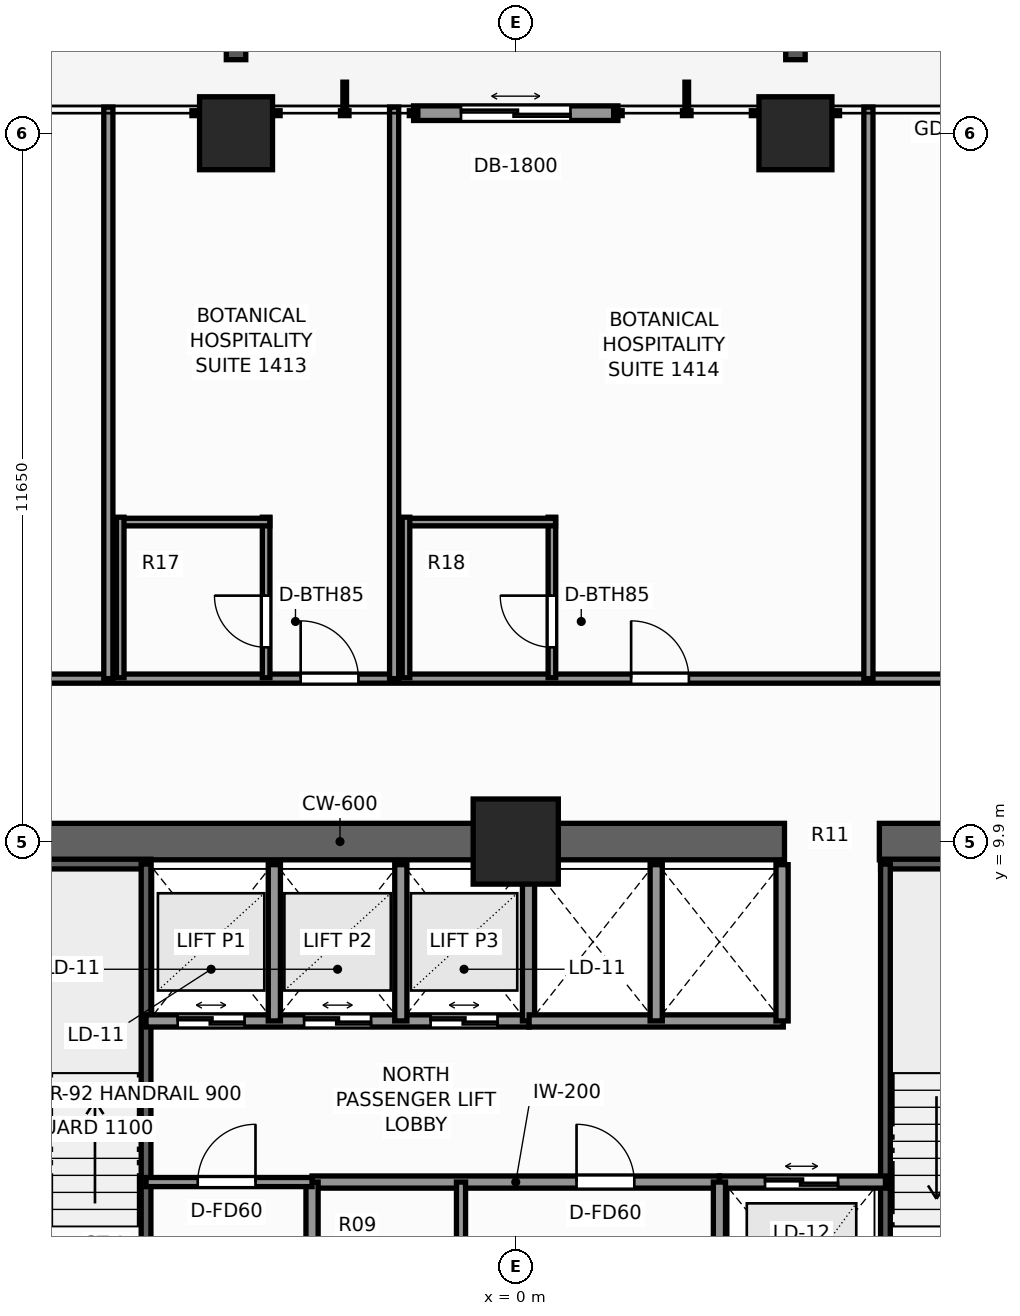
"""IFC4 building model, lengths in metres.
Left out: names, types, materials, properties, quantities, classifications, styles, units other than length and angle.
Written with IfcOpenShell. Run it as: python <this file> out.ifc"""

import sys

from ifc_helpers import new_model, si_unit, direction, frame, frame_2d, origin, origin_2d, place, context, subcontext, project, spatial, rectangle, extrude, element, fill, save


model = new_model("IFC4")
c1 = context("Model", 3, precision=1e-05, world=origin(), true_north=direction((0.0, 1.0)))
c2 = subcontext(c1, "Body", "Model", "MODEL_VIEW")
j1 = project(units=[si_unit("LENGTHUNIT", "METRE"), si_unit("PLANEANGLEUNIT", "RADIAN")], contexts=[c1])
p1 = place(None, origin())
s1 = spatial("IfcSite", under=j1, at=p1, CompositionType="ELEMENT")
p2 = place(p1, origin())
s2 = spatial("IfcBuilding", under=s1, at=p2, CompositionType="ELEMENT")
p3 = place(p2, frame((0.0, 0.0, 50.2)))
s3 = spatial("IfcBuildingStorey", under=s2, at=p3, CompositionType="ELEMENT", Elevation=50.2)
p4 = place(p3, frame((-10.2, 9.9, 0.0), z_axis=(0.0, 0.0, 1.0), x_axis=(1.0, 0.0, 0.0)))
e1 = element("IfcWall", 1, at=p4, inside=s3, PredefinedType="SHEAR", context=c2, shape_type="SweptSolid", body=[
    extrude(rectangle(XDim=14.62, YDim=0.6, at=frame_2d((7.31, 0.0))), origin(), (0.0, 0.0, 1.0), 3.3),
])
p5 = place(p3, frame((5.98, 9.9, 0.0), z_axis=(0.0, 0.0, 1.0), x_axis=(1.0, 0.0, 0.0)))
e2 = element("IfcWall", 2, at=p5, inside=s3, PredefinedType="SHEAR", context=c2, shape_type="SweptSolid", body=[
    extrude(rectangle(XDim=4.22, YDim=0.6, at=frame_2d((2.11, 0.0))), origin(), (0.0, 0.0, 1.0), 3.3),
])
p6 = place(p3, frame((0.0, 9.9, 0.0), z_axis=(0.0, 0.0, 1.0), x_axis=(1.0, 0.0, 0.0)))
e3 = element("IfcColumn", 3, at=p6, inside=s3, PredefinedType="COLUMN", context=c2, shape_type="SweptSolid", body=[
    extrude(rectangle(XDim=1.4, YDim=1.4, at=origin_2d()), origin(), (0.0, 0.0, 1.0), 3.3),
])
for number, where, z_axis, x_axis in (
    (4, (-4.6, 21.55, 0.0), (0.0, 0.0, 1.0), (1.0, 0.0, 0.0)),
    (5, (4.6, 21.55, 0.0), (0.0, 0.0, 1.0), (1.0, 0.0, 0.0)),
):
    element("IfcColumn", number, at=place(p3, frame(where, z_axis=z_axis, x_axis=x_axis)), inside=s3, PredefinedType="COLUMN", context=c2, shape_type="SweptSolid", body=[
        extrude(rectangle(XDim=1.2, YDim=1.2, at=origin_2d()), origin(), (0.0, 0.0, 1.0), 3.3),
    ])
p7 = place(p3, frame((-1.68, 21.88, 0.0), z_axis=(0.0, 0.0, 1.0), x_axis=(1.0, 0.0, 0.0)))
e6 = element("IfcWall", 6, at=p7, inside=s3, PredefinedType="STANDARD", context=c2, shape_type="SweptSolid", body=[
    extrude(rectangle(XDim=3.36, YDim=0.24, at=frame_2d((1.68, 0.0))), origin(), (0.0, 0.0, 1.0), 3.06),
])
p8 = place(p7, frame((0.78, 0.0, 0.0)))
e7 = element("IfcOpeningElement", 7, at=p8, cuts=e6, PredefinedType="OPENING", context=c2, shape_type="SweptSolid", body=[
    extrude(rectangle(XDim=1.8, YDim=2.2, at=frame_2d((0.9, 1.1))), frame((0.0, 0.13, 0.0), z_axis=(0.0, -1.0, 0.0), x_axis=(1.0, 0.0, 0.0)), (0.0, 0.0, 1.0), 0.26),
])
p9 = place(p3, frame((-9.52, 9.53, 0.0), z_axis=(0.0, 0.0, 1.0), x_axis=(1.0, 0.0, 0.0)))
e8 = element("IfcWall", 8, at=p9, inside=s3, PredefinedType="SHEAR", context=c2, shape_type="SweptSolid", body=[
    extrude(rectangle(XDim=3.52, YDim=0.16, at=frame_2d((1.76, 0.0))), origin(), (0.0, 0.0, 1.0), 3.3),
])
p10 = place(p3, frame((-6.08, 1.97, 0.0), z_axis=(0.0, 0.0, 1.0), x_axis=(0.0, 1.0, 0.0)))
e9 = element("IfcWall", 9, at=p10, inside=s3, PredefinedType="SHEAR", context=c2, shape_type="SweptSolid", body=[
    extrude(rectangle(XDim=7.56, YDim=0.16, at=frame_2d((3.78, 0.0))), origin(), (0.0, 0.0, 1.0), 3.3),
])
p11 = place(p3, frame((6.0, 9.53, 0.0), z_axis=(0.0, 0.0, 1.0), x_axis=(1.0, 0.0, 0.0)))
e10 = element("IfcWall", 10, at=p11, inside=s3, PredefinedType="SHEAR", context=c2, shape_type="SweptSolid", body=[
    extrude(rectangle(XDim=3.52, YDim=0.16, at=frame_2d((1.76, 0.0))), origin(), (0.0, 0.0, 1.0), 3.3),
])
p12 = place(p3, frame((6.08, 1.97, 0.0), z_axis=(0.0, 0.0, 1.0), x_axis=(0.0, 1.0, 0.0)))
e11 = element("IfcWall", 11, at=p12, inside=s3, PredefinedType="SHEAR", context=c2, shape_type="SweptSolid", body=[
    extrude(rectangle(XDim=7.56, YDim=0.16, at=frame_2d((3.78, 0.0))), origin(), (0.0, 0.0, 1.0), 3.3),
])
p13 = place(p3, frame((3.35, 4.3, 0.0), z_axis=(0.0, 0.0, 1.0), x_axis=(1.0, 0.0, 0.0)))
e12 = element("IfcWall", 12, at=p13, inside=s3, PredefinedType="SOLIDWALL", context=c2, shape_type="SweptSolid", body=[
    extrude(rectangle(XDim=2.73, YDim=0.2, at=frame_2d((1.365, 0.0))), origin(), (0.0, 0.0, 1.0), 3.06),
])
p14 = place(p13, frame((0.75, 0.0, 0.0)))
e13 = element("IfcOpeningElement", 13, at=p14, cuts=e12, PredefinedType="OPENING", context=c2, shape_type="SweptSolid", body=[
    extrude(rectangle(XDim=1.2, YDim=2.25, at=frame_2d((0.6, 1.125))), frame((0.0, 0.11, 0.0), z_axis=(0.0, -1.0, 0.0), x_axis=(1.0, 0.0, 0.0)), (0.0, 0.0, 1.0), 0.22),
])
p15 = place(p3, frame((-6.08, 6.95, 0.0), z_axis=(0.0, 0.0, 1.0), x_axis=(1.0, 0.0, 0.0)))
e14 = element("IfcWall", 14, at=p15, inside=s3, PredefinedType="SOLIDWALL", context=c2, shape_type="SweptSolid", body=[
    extrude(rectangle(XDim=6.3, YDim=0.2, at=frame_2d((3.15, 0.0))), origin(), (0.0, 0.0, 1.0), 3.06),
])
p16 = place(p15, frame((0.52, 0.0, 0.0)))
e15 = element("IfcOpeningElement", 15, at=p16, cuts=e14, PredefinedType="OPENING", context=c2, shape_type="SweptSolid", body=[
    extrude(rectangle(XDim=1.1, YDim=2.2, at=frame_2d((0.55, 1.1))), frame((0.0, 0.11, 0.0), z_axis=(0.0, -1.0, 0.0), x_axis=(1.0, 0.0, 0.0)), (0.0, 0.0, 1.0), 0.22),
])
p17 = place(p15, frame((2.6, 0.0, 0.0)))
e16 = element("IfcOpeningElement", 16, at=p17, cuts=e14, PredefinedType="OPENING", context=c2, shape_type="SweptSolid", body=[
    extrude(rectangle(XDim=1.1, YDim=2.2, at=frame_2d((0.55, 1.1))), frame((0.0, 0.11, 0.0), z_axis=(0.0, -1.0, 0.0), x_axis=(1.0, 0.0, 0.0)), (0.0, 0.0, 1.0), 0.22),
])
p18 = place(p15, frame((4.68, 0.0, 0.0)))
e17 = element("IfcOpeningElement", 17, at=p18, cuts=e14, PredefinedType="OPENING", context=c2, shape_type="SweptSolid", body=[
    extrude(rectangle(XDim=1.1, YDim=2.2, at=frame_2d((0.55, 1.1))), frame((0.0, 0.11, 0.0), z_axis=(0.0, -1.0, 0.0), x_axis=(1.0, 0.0, 0.0)), (0.0, 0.0, 1.0), 0.22),
])
for number, where, z_axis, x_axis in (
    (18, (-3.97, 6.95, 0.0), (0.0, 0.0, 1.0), (0.0, 1.0, 0.0)),
    (19, (-1.89, 6.95, 0.0), (0.0, 0.0, 1.0), (0.0, 1.0, 0.0)),
    (20, (0.21, 6.95, 0.0), (0.0, 0.0, 1.0), (0.0, 1.0, 0.0)),
):
    element("IfcWall", number, at=place(p3, frame(where, z_axis=z_axis, x_axis=x_axis)), inside=s3, PredefinedType="SOLIDWALL", context=c2, shape_type="SweptSolid", body=[
        extrude(rectangle(XDim=2.57, YDim=0.2, at=frame_2d((1.285, 0.0))), origin(), (0.0, 0.0, 1.0), 3.06),
    ])
p19 = place(p3, frame((0.22, 6.95, 0.0), z_axis=(0.0, 0.0, 1.0), x_axis=(1.0, 0.0, 0.0)))
e21 = element("IfcWall", 21, at=p19, inside=s3, PredefinedType="SOLIDWALL", context=c2, shape_type="SweptSolid", body=[
    extrude(rectangle(XDim=4.18, YDim=0.2, at=frame_2d((2.09, 0.0))), origin(), (0.0, 0.0, 1.0), 3.06),
])
for number, where, z_axis, x_axis in (
    (22, (4.38, 6.95, 0.0), (0.0, 0.0, 1.0), (0.0, 1.0, 0.0)),
    (23, (2.31, 6.95, 0.0), (0.0, 0.0, 1.0), (0.0, 1.0, 0.0)),
):
    element("IfcWall", number, at=place(p3, frame(where, z_axis=z_axis, x_axis=x_axis)), inside=s3, PredefinedType="SOLIDWALL", context=c2, shape_type="SweptSolid", body=[
        extrude(rectangle(XDim=2.57, YDim=0.2, at=frame_2d((1.285, 0.0))), origin(), (0.0, 0.0, 1.0), 3.06),
    ])
p20 = place(p3, frame((-3.35, 4.3, 0.0), z_axis=(0.0, 0.0, 1.0), x_axis=(1.0, 0.0, 0.0)))
e24 = element("IfcWall", 24, at=p20, inside=s3, PredefinedType="SOLIDWALL", context=c2, shape_type="SweptSolid", body=[
    extrude(rectangle(XDim=6.7, YDim=0.2, at=frame_2d((3.35, 0.0))), origin(), (0.0, 0.0, 1.0), 3.06),
])
p21 = place(p20, frame((4.35, 0.0, 0.0)))
e25 = element("IfcOpeningElement", 25, at=p21, cuts=e24, PredefinedType="OPENING", context=c2, shape_type="SweptSolid", body=[
    extrude(rectangle(XDim=0.95, YDim=2.06, at=frame_2d((0.475, 1.03))), frame((0.0, 0.11, 0.0), z_axis=(0.0, -1.0, 0.0), x_axis=(1.0, 0.0, 0.0)), (0.0, 0.0, 1.0), 0.22),
])
for number, where, z_axis, x_axis in (
    (26, (-3.35, 1.1, 0.0), (0.0, 0.0, 1.0), (0.0, 1.0, 0.0)),
    (27, (3.35, 1.1, 0.0), (0.0, 0.0, 1.0), (0.0, 1.0, 0.0)),
):
    element("IfcWall", number, at=place(p3, frame(where, z_axis=z_axis, x_axis=x_axis)), inside=s3, PredefinedType="SOLIDWALL", context=c2, shape_type="SweptSolid", body=[
        extrude(rectangle(XDim=3.2, YDim=0.2, at=frame_2d((1.6, 0.0))), origin(), (0.0, 0.0, 1.0), 3.06),
    ])
p22 = place(p3, frame((-0.9, 1.05, 0.0), z_axis=(0.0, 0.0, 1.0), x_axis=(0.0, 1.0, 0.0)))
e28 = element("IfcWall", 28, at=p22, inside=s3, PredefinedType="PARTITIONING", context=c2, shape_type="SweptSolid", body=[
    extrude(rectangle(XDim=3.25, YDim=0.15, at=frame_2d((1.625, 0.0))), origin(), (0.0, 0.0, 1.0), 3.06),
])
p23 = place(p22, frame((1.1, 0.0, 0.0)))
e29 = element("IfcOpeningElement", 29, at=p23, cuts=e28, PredefinedType="OPENING", context=c2, shape_type="SweptSolid", body=[
    extrude(rectangle(XDim=0.85, YDim=2.03, at=frame_2d((0.425, 1.015))), frame((0.0, 0.085, 0.0), z_axis=(0.0, -1.0, 0.0), x_axis=(1.0, 0.0, 0.0)), (0.0, 0.0, 1.0), 0.17),
])
p24 = place(p3, frame((-6.08, 4.3, 0.0), z_axis=(0.0, 0.0, 1.0), x_axis=(1.0, 0.0, 0.0)))
e30 = element("IfcWall", 30, at=p24, inside=s3, PredefinedType="PARTITIONING", context=c2, shape_type="SweptSolid", body=[
    extrude(rectangle(XDim=2.73, YDim=0.15, at=frame_2d((1.365, 0.0))), origin(), (0.0, 0.0, 1.0), 3.06),
])
p25 = place(p24, frame((0.85, 0.0, 0.0)))
e31 = element("IfcOpeningElement", 31, at=p25, cuts=e30, PredefinedType="OPENING", context=c2, shape_type="SweptSolid", body=[
    extrude(rectangle(XDim=0.95, YDim=2.06, at=frame_2d((0.475, 1.03))), frame((0.0, 0.085, 0.0), z_axis=(0.0, -1.0, 0.0), x_axis=(1.0, 0.0, 0.0)), (0.0, 0.0, 1.0), 0.17),
])
p26 = place(p3, frame((-12.26, 12.58, 0.0), z_axis=(0.0, 0.0, 1.0), x_axis=(1.0, 0.0, 0.0)))
e32 = element("IfcWall", 32, at=p26, inside=s3, PredefinedType="PARTITIONING", context=c2, shape_type="SweptSolid", body=[
    extrude(rectangle(XDim=24.84, YDim=0.15, at=frame_2d((12.42, 0.0))), origin(), (0.0, 0.0, 1.0), 2.272),
])
p27 = place(p26, frame((3.462, 0.0, 0.0)))
e33 = element("IfcOpeningElement", 33, at=p27, cuts=e32, PredefinedType="OPENING", context=c2, shape_type="SweptSolid", body=[
    extrude(rectangle(XDim=0.9, YDim=2.06, at=frame_2d((0.45, 1.03))), frame((0.0, 0.085, 0.0), z_axis=(0.0, -1.0, 0.0), x_axis=(1.0, 0.0, 0.0)), (0.0, 0.0, 1.0), 0.17),
])
p28 = place(p26, frame((8.723, 0.0, 0.0)))
e34 = element("IfcOpeningElement", 34, at=p28, cuts=e32, PredefinedType="OPENING", context=c2, shape_type="SweptSolid", body=[
    extrude(rectangle(XDim=0.95, YDim=2.06, at=frame_2d((0.475, 1.03))), frame((0.0, 0.085, 0.0), z_axis=(0.0, -1.0, 0.0), x_axis=(1.0, 0.0, 0.0)), (0.0, 0.0, 1.0), 0.17),
])
p29 = place(p26, frame((14.157, 0.0, 0.0)))
e35 = element("IfcOpeningElement", 35, at=p29, cuts=e32, PredefinedType="OPENING", context=c2, shape_type="SweptSolid", body=[
    extrude(rectangle(XDim=0.95, YDim=2.06, at=frame_2d((0.475, 1.03))), frame((0.0, 0.085, 0.0), z_axis=(0.0, -1.0, 0.0), x_axis=(1.0, 0.0, 0.0)), (0.0, 0.0, 1.0), 0.17),
])
p30 = place(p26, frame((19.542, 0.0, 0.0)))
e36 = element("IfcOpeningElement", 36, at=p30, cuts=e32, PredefinedType="OPENING", context=c2, shape_type="SweptSolid", body=[
    extrude(rectangle(XDim=0.9, YDim=2.06, at=frame_2d((0.45, 1.03))), frame((0.0, 0.085, 0.0), z_axis=(0.0, -1.0, 0.0), x_axis=(1.0, 0.0, 0.0)), (0.0, 0.0, 1.0), 0.17),
])
for number, where, z_axis, x_axis in (
    (37, (-6.7, 12.58, 0.0), (0.0, 0.0, 1.0), (0.0, 1.0, 0.0)),
    (38, (-2.0, 12.58, 0.0), (0.0, 0.0, 1.0), (0.0, 1.0, 0.0)),
):
    element("IfcWall", number, at=place(p3, frame(where, z_axis=z_axis, x_axis=x_axis)), inside=s3, PredefinedType="PARTITIONING", context=c2, shape_type="SweptSolid", body=[
        extrude(rectangle(XDim=9.4, YDim=0.15, at=frame_2d((4.7, 0.0))), origin(), (0.0, 0.0, 1.0), 2.429),
    ])
p31 = place(p3, frame((-4.105, 12.595, 0.0), z_axis=(0.0, 0.0, 1.0), x_axis=(0.0, 1.0, 0.0)))
e39 = element("IfcWall", 39, at=p31, inside=s3, PredefinedType="PARTITIONING", context=c2, shape_type="SweptSolid", body=[
    extrude(rectangle(XDim=2.64, YDim=0.125, at=frame_2d((1.32, 0.0))), origin(), (0.0, 0.0, 1.0), 3.06),
])
p32 = place(p31, frame((0.5, 0.0, 0.0)))
e40 = element("IfcOpeningElement", 40, at=p32, cuts=e39, PredefinedType="OPENING", context=c2, shape_type="SweptSolid", body=[
    extrude(rectangle(XDim=0.85, YDim=2.03, at=frame_2d((0.425, 1.015))), frame((0.0, 0.073, 0.0), z_axis=(0.0, -1.0, 0.0), x_axis=(1.0, 0.0, 0.0)), (0.0, 0.0, 1.0), 0.145),
])
p33 = place(p3, frame((-6.565, 15.155, 0.0), z_axis=(0.0, 0.0, 1.0), x_axis=(1.0, 0.0, 0.0)))
e41 = element("IfcWall", 41, at=p33, inside=s3, PredefinedType="PARTITIONING", context=c2, shape_type="SweptSolid", body=[
    extrude(rectangle(XDim=2.52, YDim=0.125, at=frame_2d((1.26, 0.0))), origin(), (0.0, 0.0, 1.0), 2.272),
])
p34 = place(p3, frame((-6.505, 12.595, 0.0), z_axis=(0.0, 0.0, 1.0), x_axis=(0.0, 1.0, 0.0)))
e42 = element("IfcWall", 42, at=p34, inside=s3, PredefinedType="PARTITIONING", context=c2, shape_type="SweptSolid", body=[
    extrude(rectangle(XDim=2.64, YDim=0.125, at=frame_2d((1.32, 0.0))), origin(), (0.0, 0.0, 1.0), 3.06),
])
p35 = place(p3, frame((5.8, 12.58, 0.0), z_axis=(0.0, 0.0, 1.0), x_axis=(0.0, 1.0, 0.0)))
e43 = element("IfcWall", 43, at=p35, inside=s3, PredefinedType="PARTITIONING", context=c2, shape_type="SweptSolid", body=[
    extrude(rectangle(XDim=9.4, YDim=0.15, at=frame_2d((4.7, 0.0))), origin(), (0.0, 0.0, 1.0), 2.429),
])
p36 = place(p3, frame((0.595, 12.595, 0.0), z_axis=(0.0, 0.0, 1.0), x_axis=(0.0, 1.0, 0.0)))
e44 = element("IfcWall", 44, at=p36, inside=s3, PredefinedType="PARTITIONING", context=c2, shape_type="SweptSolid", body=[
    extrude(rectangle(XDim=2.64, YDim=0.125, at=frame_2d((1.32, 0.0))), origin(), (0.0, 0.0, 1.0), 3.06),
])
p37 = place(p36, frame((0.5, 0.0, 0.0)))
e45 = element("IfcOpeningElement", 45, at=p37, cuts=e44, PredefinedType="OPENING", context=c2, shape_type="SweptSolid", body=[
    extrude(rectangle(XDim=0.85, YDim=2.03, at=frame_2d((0.425, 1.015))), frame((0.0, 0.073, 0.0), z_axis=(0.0, -1.0, 0.0), x_axis=(1.0, 0.0, 0.0)), (0.0, 0.0, 1.0), 0.145),
])
p38 = place(p3, frame((-1.865, 15.155, 0.0), z_axis=(0.0, 0.0, 1.0), x_axis=(1.0, 0.0, 0.0)))
e46 = element("IfcWall", 46, at=p38, inside=s3, PredefinedType="PARTITIONING", context=c2, shape_type="SweptSolid", body=[
    extrude(rectangle(XDim=2.52, YDim=0.125, at=frame_2d((1.26, 0.0))), origin(), (0.0, 0.0, 1.0), 2.585),
])
p39 = place(p3, frame((-1.805, 12.595, 0.0), z_axis=(0.0, 0.0, 1.0), x_axis=(0.0, 1.0, 0.0)))
e47 = element("IfcWall", 47, at=p39, inside=s3, PredefinedType="PARTITIONING", context=c2, shape_type="SweptSolid", body=[
    extrude(rectangle(XDim=2.64, YDim=0.125, at=frame_2d((1.32, 0.0))), origin(), (0.0, 0.0, 1.0), 3.06),
])
p40 = place(p8, origin())
e48 = element("IfcDoor", 48, at=p40, inside=s3, OperationType="DOUBLE_DOOR_SLIDING", PredefinedType="DOOR", context=c2, shape_type="SweptSolid", body=[
    extrude(rectangle(XDim=1.8, YDim=2.2, at=frame_2d((0.9, 1.1))), frame((0.0, 0.025, 0.0), z_axis=(0.0, -1.0, 0.0), x_axis=(1.0, 0.0, 0.0)), (0.0, 0.0, 1.0), 0.05),
])
fill(e7, e48)
p41 = place(p14, origin())
e49 = element("IfcDoor", 49, at=p41, inside=s3, OperationType="DOUBLE_DOOR_SLIDING", PredefinedType="DOOR", context=c2, shape_type="SweptSolid", body=[
    extrude(rectangle(XDim=1.2, YDim=2.25, at=frame_2d((0.6, 1.125))), frame((0.0, 0.025, 0.0), z_axis=(0.0, -1.0, 0.0), x_axis=(1.0, 0.0, 0.0)), (0.0, 0.0, 1.0), 0.05),
])
fill(e13, e49)
p42 = place(p16, origin())
e50 = element("IfcDoor", 50, at=p42, inside=s3, OperationType="DOUBLE_DOOR_SLIDING", PredefinedType="DOOR", context=c2, shape_type="SweptSolid", body=[
    extrude(rectangle(XDim=1.1, YDim=2.2, at=frame_2d((0.55, 1.1))), frame((0.0, 0.025, 0.0), z_axis=(0.0, -1.0, 0.0), x_axis=(1.0, 0.0, 0.0)), (0.0, 0.0, 1.0), 0.05),
])
fill(e15, e50)
p43 = place(p17, origin())
e51 = element("IfcDoor", 51, at=p43, inside=s3, OperationType="DOUBLE_DOOR_SLIDING", PredefinedType="DOOR", context=c2, shape_type="SweptSolid", body=[
    extrude(rectangle(XDim=1.1, YDim=2.2, at=frame_2d((0.55, 1.1))), frame((0.0, 0.025, 0.0), z_axis=(0.0, -1.0, 0.0), x_axis=(1.0, 0.0, 0.0)), (0.0, 0.0, 1.0), 0.05),
])
fill(e16, e51)
p44 = place(p18, origin())
e52 = element("IfcDoor", 52, at=p44, inside=s3, OperationType="DOUBLE_DOOR_SLIDING", PredefinedType="DOOR", context=c2, shape_type="SweptSolid", body=[
    extrude(rectangle(XDim=1.1, YDim=2.2, at=frame_2d((0.55, 1.1))), frame((0.0, 0.025, 0.0), z_axis=(0.0, -1.0, 0.0), x_axis=(1.0, 0.0, 0.0)), (0.0, 0.0, 1.0), 0.05),
])
fill(e17, e52)
p45 = place(p21, origin())
e53 = element("IfcDoor", 53, at=p45, inside=s3, OperationType="SINGLE_SWING_LEFT", PredefinedType="DOOR", context=c2, shape_type="SweptSolid", body=[
    extrude(rectangle(XDim=0.95, YDim=2.06, at=frame_2d((0.475, 1.03))), frame((0.0, 0.025, 0.0), z_axis=(0.0, -1.0, 0.0), x_axis=(1.0, 0.0, 0.0)), (0.0, 0.0, 1.0), 0.05),
])
fill(e25, e53)
p46 = place(p25, origin())
e54 = element("IfcDoor", 54, at=p46, inside=s3, OperationType="SINGLE_SWING_RIGHT", PredefinedType="DOOR", context=c2, shape_type="SweptSolid", body=[
    extrude(rectangle(XDim=0.95, YDim=2.06, at=frame_2d((0.475, 1.03))), frame((0.0, 0.025, 0.0), z_axis=(0.0, -1.0, 0.0), x_axis=(1.0, 0.0, 0.0)), (0.0, 0.0, 1.0), 0.05),
])
fill(e31, e54)
p47 = place(p32, origin())
e55 = element("IfcDoor", 55, at=p47, inside=s3, OperationType="SINGLE_SWING_RIGHT", PredefinedType="DOOR", context=c2, shape_type="SweptSolid", body=[
    extrude(rectangle(XDim=0.85, YDim=2.03, at=frame_2d((0.425, 1.015))), frame((0.0, 0.025, 0.0), z_axis=(0.0, -1.0, 0.0), x_axis=(1.0, 0.0, 0.0)), (0.0, 0.0, 1.0), 0.05),
])
fill(e40, e55)
p48 = place(p28, origin())
e56 = element("IfcDoor", 56, at=p48, inside=s3, OperationType="SINGLE_SWING_LEFT", PredefinedType="DOOR", context=c2, shape_type="SweptSolid", body=[
    extrude(rectangle(XDim=0.95, YDim=2.06, at=frame_2d((0.475, 1.03))), frame((0.0, 0.025, 0.0), z_axis=(0.0, -1.0, 0.0), x_axis=(1.0, 0.0, 0.0)), (0.0, 0.0, 1.0), 0.05),
])
fill(e34, e56)
p49 = place(p37, origin())
e57 = element("IfcDoor", 57, at=p49, inside=s3, OperationType="SINGLE_SWING_RIGHT", PredefinedType="DOOR", context=c2, shape_type="SweptSolid", body=[
    extrude(rectangle(XDim=0.85, YDim=2.03, at=frame_2d((0.425, 1.015))), frame((0.0, 0.025, 0.0), z_axis=(0.0, -1.0, 0.0), x_axis=(1.0, 0.0, 0.0)), (0.0, 0.0, 1.0), 0.05),
])
fill(e45, e57)
p50 = place(p29, origin())
e58 = element("IfcDoor", 58, at=p50, inside=s3, OperationType="SINGLE_SWING_LEFT", PredefinedType="DOOR", context=c2, shape_type="SweptSolid", body=[
    extrude(rectangle(XDim=0.95, YDim=2.06, at=frame_2d((0.475, 1.03))), frame((0.0, 0.025, 0.0), z_axis=(0.0, -1.0, 0.0), x_axis=(1.0, 0.0, 0.0)), (0.0, 0.0, 1.0), 0.05),
])
fill(e35, e58)
save(model, sys.argv[1])
